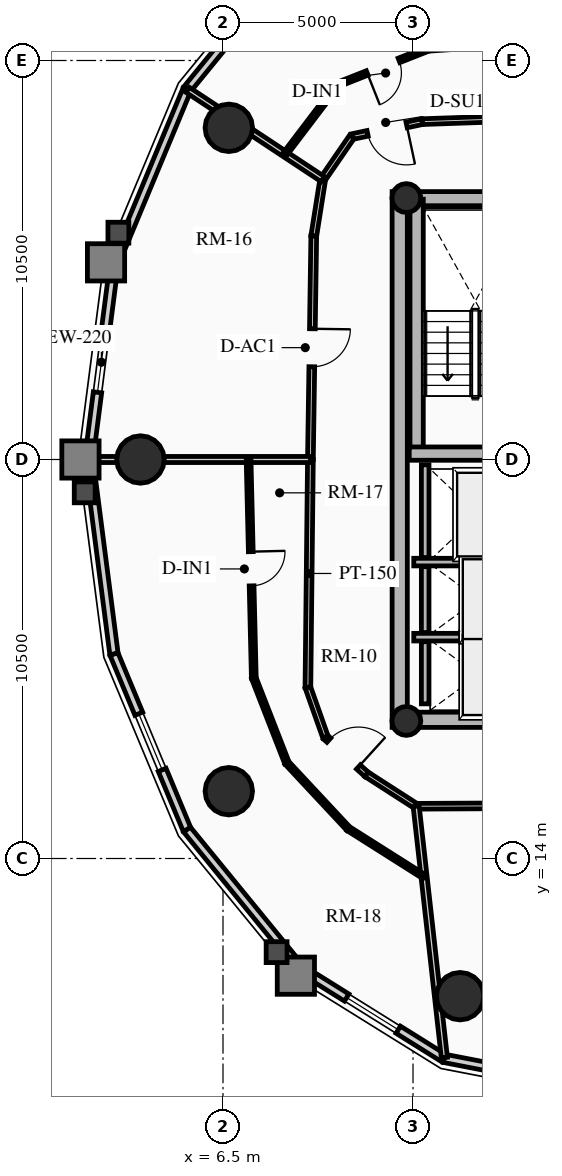
"""IFC4 building model, lengths in metres.
Left out: names, types, materials, properties, quantities, classifications, styles, units other than length and angle.
Written with IfcOpenShell. Run it as: python <this file> out.ifc"""

import sys

from ifc_helpers import new_model, si_unit, direction, frame, frame_2d, origin, origin_2d, place, context, subcontext, project, spatial, rectangle, circle, hollow_circle, extrude, source, transform, mapped, element, fill, save


model = new_model("IFC4")
c1 = context("Model", 3, precision=1e-05, world=origin(), true_north=direction((0.0, 1.0)))
c2 = subcontext(c1, "Body", "Model", "MODEL_VIEW")
j1 = project(units=[si_unit("LENGTHUNIT", "METRE"), si_unit("PLANEANGLEUNIT", "RADIAN")], contexts=[c1])
p1 = place(None, origin())
s1 = spatial("IfcSite", under=j1, at=p1, CompositionType="ELEMENT")
p2 = place(p1, origin())
s2 = spatial("IfcBuilding", under=s1, at=p2, CompositionType="ELEMENT")
p3 = place(p2, frame((0.0, 0.0, 169.06)))
s3 = spatial("IfcBuildingStorey", under=s2, at=p3, CompositionType="ELEMENT", Elevation=169.06)
p4 = place(p3, frame((11.15, 17.45, 0.0), z_axis=(0.0, 0.0, 1.0), x_axis=(0.0, 1.0, 0.0)))
e1 = element("IfcWall", 1, at=p4, inside=s3, PredefinedType="SHEAR", context=c2, shape_type="SweptSolid", body=[
    extrude(rectangle(XDim=14.1, YDim=0.4, at=frame_2d((7.05, 0.0))), origin(), (0.0, 0.0, 1.0), 2.91),
])
p5 = place(p3, frame((11.15, 17.65, 0.0), z_axis=(0.0, 0.0, 1.0), x_axis=(1.0, 0.0, 0.0)))
e2 = element("IfcWall", 2, at=p5, inside=s3, PredefinedType="SHEAR", context=c2, shape_type="SweptSolid", body=[
    extrude(rectangle(XDim=10.7, YDim=0.4, at=frame_2d((5.35, 0.0))), origin(), (0.0, 0.0, 1.0), 2.91),
])
m1 = source(origin(), c2, "Body", "SweptSolid", [
    extrude(rectangle(XDim=1.5, YDim=2.02, at=frame_2d((0.75, 1.01))), frame((0.0, 0.21, 0.0), z_axis=(0.0, -1.0, 0.0), x_axis=(1.0, 0.0, 0.0)), (0.0, 0.0, 1.0), 0.42),
])
p6 = place(p5, frame((5.45, 0.0, 0.0)))
e3 = element("IfcOpeningElement", 3, at=p6, cuts=e2, PredefinedType="OPENING", context=c2, shape_type="MappedRepresentation", body=[
    mapped(m1, transform((0.0, 0.0, 0.0), x_axis=(1.0, 0.0, 0.0), y_axis=(0.0, 1.0, 0.0), z_axis=(0.0, 0.0, 1.0), scale=1.0)),
])
p7 = place(p3, frame((11.15, 31.35, 0.0), z_axis=(0.0, 0.0, 1.0), x_axis=(1.0, 0.0, 0.0)))
e4 = element("IfcWall", 4, at=p7, inside=s3, PredefinedType="SHEAR", context=c2, shape_type="SweptSolid", body=[
    extrude(rectangle(XDim=10.7, YDim=0.4, at=frame_2d((5.35, 0.0))), origin(), (0.0, 0.0, 1.0), 2.91),
])
p8 = place(p7, frame((4.6, 0.0, 0.0)))
e5 = element("IfcOpeningElement", 5, at=p8, cuts=e4, PredefinedType="OPENING", context=c2, shape_type="MappedRepresentation", body=[
    mapped(m1, transform((0.0, 0.0, 0.0), x_axis=(1.0, 0.0, 0.0), y_axis=(0.0, 1.0, 0.0), z_axis=(0.0, 0.0, 1.0), scale=1.0)),
])
p9 = place(p3, frame((11.595, 24.655, 0.0), z_axis=(0.0, 0.0, 1.0), x_axis=(0.0, 1.0, 0.0)))
e6 = element("IfcWall", 6, at=p9, inside=s3, PredefinedType="SHEAR", context=c2, shape_type="SweptSolid", body=[
    extrude(rectangle(XDim=6.695, YDim=0.35, at=frame_2d((3.348, 0.0))), origin(), (0.0, 0.0, 1.0), 2.91),
])
p10 = place(p3, frame((11.4, 24.655, 0.0), z_axis=(0.0, 0.0, 1.0), x_axis=(1.0, 0.0, 0.0)))
e7 = element("IfcWall", 7, at=p10, inside=s3, PredefinedType="SHEAR", context=c2, shape_type="SweptSolid", body=[
    extrude(rectangle(XDim=3.285, YDim=0.35, at=frame_2d((1.643, 0.0))), origin(), (0.0, 0.0, 1.0), 2.91),
])
for number, where, z_axis, x_axis in (
    (8, (11.325, 17.62, 0.0), (0.0, 0.0, 1.0), (1.0, 0.0, 0.0)),
    (9, (11.325, 31.38, 0.0), (0.0, 0.0, 1.0), (1.0, 0.0, 0.0)),
):
    element("IfcColumn", number, at=place(p3, frame(where, z_axis=z_axis, x_axis=x_axis)), inside=s3, PredefinedType="COLUMN", context=c2, shape_type="SweptSolid", body=[
        extrude(hollow_circle(Radius=0.38, WallThickness=0.032, at=origin_2d()), origin(), (0.0, 0.0, 1.0), 2.91),
    ])
for number, where, z_axis, x_axis in (
    (10, (6.653, 33.229, 0.0), (0.0, 0.0, 1.0), (1.0, 0.0, 0.0)),
    (11, (4.328, 24.5, 0.0), (0.0, 0.0, 1.0), (1.0, 0.0, 0.0)),
    (12, (6.653, 15.771, 0.0), (0.0, 0.0, 1.0), (1.0, 0.0, 0.0)),
    (13, (12.739, 10.377, 0.0), (0.0, 0.0, 1.0), (1.0, 0.0, 0.0)),
):
    element("IfcColumn", number, at=place(p3, frame(where, z_axis=z_axis, x_axis=x_axis)), inside=s3, PredefinedType="USERDEFINED", context=c2, shape_type="SweptSolid", body=[
        extrude(circle(Radius=0.625, at=origin_2d()), origin(), (0.0, 0.0, 1.0), 2.91),
    ])
p11 = place(p3, frame((5.553, 34.24, 0.0), z_axis=(0.0, 0.0, 1.0), x_axis=(0.632470615287, 0.774584353572, 0.0)))
e14 = element("IfcWall", 14, at=p11, inside=s3, PredefinedType="SOLIDWALL", context=c2, shape_type="SweptSolid", body=[
    extrude(rectangle(XDim=4.733, YDim=0.22, at=frame_2d((2.366, 0.0))), origin(), (0.0, 0.0, 1.0), 2.245),
])
m2 = source(origin(), c2, "Body", "SweptSolid", [
    extrude(rectangle(XDim=1.6, YDim=1.3, at=frame_2d((0.8, 0.65))), frame((0.0, 0.12, 0.0), z_axis=(0.0, -1.0, 0.0), x_axis=(1.0, 0.0, 0.0)), (0.0, 0.0, 1.0), 0.24),
])
p12 = place(p11, frame((1.566, 0.0, 0.65)))
e15 = element("IfcOpeningElement", 15, at=p12, cuts=e14, PredefinedType="OPENING", context=c2, shape_type="MappedRepresentation", body=[
    mapped(m2, transform((0.0, 0.0, 0.0), x_axis=(1.0, 0.0, 0.0), y_axis=(0.0, 1.0, 0.0), z_axis=(0.0, 0.0, 1.0), scale=1.0)),
])
p13 = place(p3, frame((3.631, 29.62, 0.0), z_axis=(0.0, 0.0, 1.0), x_axis=(0.384144094086, 0.923273152961, 0.0)))
e16 = element("IfcWall", 16, at=p13, inside=s3, PredefinedType="SOLIDWALL", context=c2, shape_type="SweptSolid", body=[
    extrude(rectangle(XDim=5.003, YDim=0.22, at=frame_2d((2.501, 0.0))), origin(), (0.0, 0.0, 1.0), 2.245),
])
p14 = place(p3, frame((2.969, 24.5, 0.0), z_axis=(0.0, 0.0, 1.0), x_axis=(0.128287912609, 0.991736966881, 0.0)))
e17 = element("IfcWall", 17, at=p14, inside=s3, PredefinedType="SOLIDWALL", context=c2, shape_type="SweptSolid", body=[
    extrude(rectangle(XDim=5.163, YDim=0.22, at=frame_2d((2.582, 0.0))), origin(), (0.0, 0.0, 1.0), 2.245),
])
p15 = place(p14, frame((1.782, 0.0, 0.65)))
e18 = element("IfcOpeningElement", 18, at=p15, cuts=e17, PredefinedType="OPENING", context=c2, shape_type="MappedRepresentation", body=[
    mapped(m2, transform((0.0, 0.0, 0.0), x_axis=(1.0, 0.0, 0.0), y_axis=(0.0, 1.0, 0.0), z_axis=(0.0, 0.0, 1.0), scale=1.0)),
])
p16 = place(p3, frame((3.631, 19.38, 0.0), z_axis=(0.0, 0.0, 1.0), x_axis=(-0.128287912609, 0.991736966881, 0.0)))
e19 = element("IfcWall", 19, at=p16, inside=s3, PredefinedType="SOLIDWALL", context=c2, shape_type="SweptSolid", body=[
    extrude(rectangle(XDim=5.163, YDim=0.22, at=frame_2d((2.582, 0.0))), origin(), (0.0, 0.0, 1.0), 2.245),
])
p17 = place(p3, frame((5.553, 14.76, 0.0), z_axis=(0.0, 0.0, 1.0), x_axis=(-0.384144094086, 0.923273152961, 0.0)))
e20 = element("IfcWall", 20, at=p17, inside=s3, PredefinedType="SOLIDWALL", context=c2, shape_type="SweptSolid", body=[
    extrude(rectangle(XDim=5.003, YDim=0.22, at=frame_2d((2.501, 0.0))), origin(), (0.0, 0.0, 1.0), 2.245),
])
p18 = place(p17, frame((1.702, 0.0, 0.65)))
e21 = element("IfcOpeningElement", 21, at=p18, cuts=e20, PredefinedType="OPENING", context=c2, shape_type="MappedRepresentation", body=[
    mapped(m2, transform((0.0, 0.0, 0.0), x_axis=(1.0, 0.0, 0.0), y_axis=(0.0, 1.0, 0.0), z_axis=(0.0, 0.0, 1.0), scale=1.0)),
])
p19 = place(p3, frame((8.547, 11.094, 0.0), z_axis=(0.0, 0.0, 1.0), x_axis=(-0.632470615287, 0.774584353572, 0.0)))
e22 = element("IfcWall", 22, at=p19, inside=s3, PredefinedType="SOLIDWALL", context=c2, shape_type="SweptSolid", body=[
    extrude(rectangle(XDim=4.733, YDim=0.22, at=frame_2d((2.366, 0.0))), origin(), (0.0, 0.0, 1.0), 2.245),
])
p20 = place(p3, frame((12.319, 8.741, 0.0), z_axis=(0.0, 0.0, 1.0), x_axis=(-0.848399108042, 0.529357113368, 0.0)))
e23 = element("IfcWall", 23, at=p20, inside=s3, PredefinedType="SOLIDWALL", context=c2, shape_type="SweptSolid", body=[
    extrude(rectangle(XDim=4.446, YDim=0.22, at=frame_2d((2.223, 0.0))), origin(), (0.0, 0.0, 1.0), 2.245),
])
p21 = place(p20, frame((1.423, 0.0, 0.65)))
e24 = element("IfcOpeningElement", 24, at=p21, cuts=e23, PredefinedType="OPENING", context=c2, shape_type="MappedRepresentation", body=[
    mapped(m2, transform((0.0, 0.0, 0.0), x_axis=(1.0, 0.0, 0.0), y_axis=(0.0, 1.0, 0.0), z_axis=(0.0, 0.0, 1.0), scale=1.0)),
])
p22 = place(p3, frame((16.5, 7.93, 0.0), z_axis=(0.0, 0.0, 1.0), x_axis=(-0.981703883443, 0.190413983815, 0.0)))
e25 = element("IfcWall", 25, at=p22, inside=s3, PredefinedType="SOLIDWALL", context=c2, shape_type="SweptSolid", body=[
    extrude(rectangle(XDim=4.259, YDim=0.22, at=frame_2d((2.13, 0.0))), origin(), (0.0, 0.0, 1.0), 2.245),
])
p23 = place(p22, frame((1.33, 0.0, 0.65)))
e26 = element("IfcOpeningElement", 26, at=p23, cuts=e25, PredefinedType="OPENING", context=c2, shape_type="MappedRepresentation", body=[
    mapped(m2, transform((0.0, 0.0, 0.0), x_axis=(1.0, 0.0, 0.0), y_axis=(0.0, 1.0, 0.0), z_axis=(0.0, 0.0, 1.0), scale=1.0)),
])
p24 = place(p3, frame((11.52, 21.8, 0.0), z_axis=(0.0, 0.0, 1.0), x_axis=(1.0, 0.0, 0.0)))
e27 = element("IfcWall", 27, at=p24, inside=s3, PredefinedType="SHEAR", context=c2, shape_type="SweptSolid", body=[
    extrude(rectangle(XDim=2.97, YDim=0.2, at=frame_2d((1.485, 0.0))), origin(), (0.0, 0.0, 1.0), 2.91),
])
p25 = place(p3, frame((11.82, 21.92, 0.0), z_axis=(0.0, 0.0, 1.0), x_axis=(0.0, 1.0, 0.0)))
e28 = element("IfcWall", 28, at=p25, inside=s3, PredefinedType="SHEAR", context=c2, shape_type="SweptSolid", body=[
    extrude(rectangle(XDim=2.44, YDim=0.2, at=frame_2d((1.22, 0.0))), origin(), (0.0, 0.0, 1.0), 2.91),
])
p26 = place(p3, frame((11.52, 19.825, 0.0), z_axis=(0.0, 0.0, 1.0), x_axis=(1.0, 0.0, 0.0)))
e29 = element("IfcWall", 29, at=p26, inside=s3, PredefinedType="SHEAR", context=c2, shape_type="SweptSolid", body=[
    extrude(rectangle(XDim=2.97, YDim=0.2, at=frame_2d((1.485, 0.0))), origin(), (0.0, 0.0, 1.0), 2.91),
])
p27 = place(p3, frame((11.82, 19.945, 0.0), z_axis=(0.0, 0.0, 1.0), x_axis=(0.0, 1.0, 0.0)))
e30 = element("IfcWall", 30, at=p27, inside=s3, PredefinedType="SHEAR", context=c2, shape_type="SweptSolid", body=[
    extrude(rectangle(XDim=1.735, YDim=0.2, at=frame_2d((0.867, 0.0))), origin(), (0.0, 0.0, 1.0), 2.91),
])
p28 = place(p3, frame((11.82, 18.07, 0.0), z_axis=(0.0, 0.0, 1.0), x_axis=(0.0, 1.0, 0.0)))
e31 = element("IfcWall", 31, at=p28, inside=s3, PredefinedType="SHEAR", context=c2, shape_type="SweptSolid", body=[
    extrude(rectangle(XDim=1.635, YDim=0.2, at=frame_2d((0.817, 0.0))), origin(), (0.0, 0.0, 1.0), 2.91),
])
p29 = place(p3, frame((18.102, 33.61, 0.0), z_axis=(0.0, 0.0, 1.0), x_axis=(-0.999410320072, -0.034336746121, 0.0)))
e32 = element("IfcWall", 32, at=p29, inside=s3, PredefinedType="PARTITIONING", context=c2, shape_type="SweptSolid", body=[
    extrude(rectangle(XDim=6.364, YDim=0.15, at=frame_2d((3.182, 0.0))), origin(), (0.0, 0.0, 1.0), 2.245),
])
p30 = place(p3, frame((11.742, 33.391, 0.0), z_axis=(0.0, 0.0, 1.0), x_axis=(-0.977853431612, -0.209290865268, 0.0)))
e33 = element("IfcWall", 33, at=p30, inside=s3, PredefinedType="PARTITIONING", context=c2, shape_type="SweptSolid", body=[
    extrude(rectangle(XDim=1.89, YDim=0.15, at=frame_2d((0.945, 0.0))), origin(), (0.0, 0.0, 1.0), 2.245),
])
m3 = source(origin(), c2, "Body", "SweptSolid", [
    extrude(rectangle(XDim=1.05, YDim=2.015, at=frame_2d((0.525, 1.007))), frame((0.0, 0.085, 0.0), z_axis=(0.0, -1.0, 0.0), x_axis=(1.0, 0.0, 0.0)), (0.0, 0.0, 1.0), 0.17),
])
p31 = place(p30, frame((0.42, 0.0, 0.0)))
e34 = element("IfcOpeningElement", 34, at=p31, cuts=e33, PredefinedType="OPENING", context=c2, shape_type="MappedRepresentation", body=[
    mapped(m3, transform((0.0, 0.0, 0.0), x_axis=(1.0, 0.0, 0.0), y_axis=(0.0, 1.0, 0.0), z_axis=(0.0, 0.0, 1.0), scale=1.0)),
])
p32 = place(p3, frame((9.894, 32.996, 0.0), z_axis=(0.0, 0.0, 1.0), x_axis=(-0.566521185207, -0.824047175052, 0.0)))
e35 = element("IfcWall", 35, at=p32, inside=s3, PredefinedType="PARTITIONING", context=c2, shape_type="SweptSolid", body=[
    extrude(rectangle(XDim=1.357, YDim=0.15, at=frame_2d((0.678, 0.0))), origin(), (0.0, 0.0, 1.0), 2.245),
])
p33 = place(p3, frame((9.126, 31.878, 0.0), z_axis=(0.0, 0.0, 1.0), x_axis=(-0.156632813117, -0.98765690493, 0.0)))
e36 = element("IfcWall", 36, at=p33, inside=s3, PredefinedType="PARTITIONING", context=c2, shape_type="SweptSolid", body=[
    extrude(rectangle(XDim=1.515, YDim=0.15, at=frame_2d((0.758, 0.0))), origin(), (0.0, 0.0, 1.0), 2.245),
])
p34 = place(p3, frame((8.888, 30.381, 0.0), z_axis=(0.0, 0.0, 1.0), x_axis=(-0.015025285815, -0.999887114021, 0.0)))
e37 = element("IfcWall", 37, at=p34, inside=s3, PredefinedType="PARTITIONING", context=c2, shape_type="SweptSolid", body=[
    extrude(rectangle(XDim=5.882, YDim=0.15, at=frame_2d((2.941, 0.0))), origin(), (0.0, 0.0, 1.0), 2.675),
])
m4 = source(origin(), c2, "Body", "SweptSolid", [
    extrude(rectangle(XDim=1.0, YDim=2.015, at=frame_2d((0.5, 1.007))), frame((0.0, 0.085, 0.0), z_axis=(0.0, -1.0, 0.0), x_axis=(1.0, 0.0, 0.0)), (0.0, 0.0, 1.0), 0.17),
])
p35 = place(p34, frame((2.441, 0.0, 0.0)))
e38 = element("IfcOpeningElement", 38, at=p35, cuts=e37, PredefinedType="OPENING", context=c2, shape_type="MappedRepresentation", body=[
    mapped(m4, transform((0.0, 0.0, 0.0), x_axis=(1.0, 0.0, 0.0), y_axis=(0.0, 1.0, 0.0), z_axis=(0.0, 0.0, 1.0), scale=1.0)),
])
p36 = place(p3, frame((8.8, 24.5, 0.0), z_axis=(0.0, 0.0, 1.0), x_axis=(-0.011028591374, -0.999939183237, 0.0)))
e39 = element("IfcWall", 39, at=p36, inside=s3, PredefinedType="PARTITIONING", context=c2, shape_type="SweptSolid", body=[
    extrude(rectangle(XDim=5.999, YDim=0.15, at=frame_2d((3.0, 0.0))), origin(), (0.0, 0.0, 1.0), 2.245),
])
p37 = place(p3, frame((8.734, 18.501, 0.0), z_axis=(0.0, 0.0, 1.0), x_axis=(0.333612366873, -0.94271034187, 0.0)))
e40 = element("IfcWall", 40, at=p37, inside=s3, PredefinedType="PARTITIONING", context=c2, shape_type="SweptSolid", body=[
    extrude(rectangle(XDim=1.386, YDim=0.15, at=frame_2d((0.693, 0.0))), origin(), (0.0, 0.0, 1.0), 2.245),
])
p38 = place(p3, frame((9.196, 17.195, 0.0), z_axis=(0.0, 0.0, 1.0), x_axis=(0.740734525483, -0.671797858553, 0.0)))
e41 = element("IfcWall", 41, at=p38, inside=s3, PredefinedType="PARTITIONING", context=c2, shape_type="SweptSolid", body=[
    extrude(rectangle(XDim=1.459, YDim=0.15, at=frame_2d((0.729, 0.0))), origin(), (0.0, 0.0, 1.0), 2.245),
])
p39 = place(p38, frame((0.12, 0.0, 0.0)))
e42 = element("IfcOpeningElement", 42, at=p39, cuts=e41, PredefinedType="OPENING", context=c2, shape_type="MappedRepresentation", body=[
    mapped(m3, transform((0.0, 0.0, 0.0), x_axis=(1.0, 0.0, 0.0), y_axis=(0.0, 1.0, 0.0), z_axis=(0.0, 0.0, 1.0), scale=1.0)),
])
p40 = place(p3, frame((10.277, 16.214, 0.0), z_axis=(0.0, 0.0, 1.0), x_axis=(0.841060909507, -0.540940427865, 0.0)))
e43 = element("IfcWall", 43, at=p40, inside=s3, PredefinedType="PARTITIONING", context=c2, shape_type="SweptSolid", body=[
    extrude(rectangle(XDim=1.552, YDim=0.15, at=frame_2d((0.776, 0.0))), origin(), (0.0, 0.0, 1.0), 2.245),
])
p41 = place(p3, frame((11.583, 15.375, 0.0), z_axis=(0.0, 0.0, 1.0), x_axis=(0.999988014548, 0.004895994347, 0.0)))
e44 = element("IfcWall", 44, at=p41, inside=s3, PredefinedType="PARTITIONING", context=c2, shape_type="SweptSolid", body=[
    extrude(rectangle(XDim=3.241, YDim=0.15, at=frame_2d((1.621, 0.0))), origin(), (0.0, 0.0, 1.0), 2.245),
])
p42 = place(p3, frame((9.126, 31.878, 0.0), z_axis=(0.0, 0.0, 1.0), x_axis=(-0.834299098788, 0.551312083815, 0.0)))
e45 = element("IfcWall", 45, at=p42, inside=s3, PredefinedType="PARTITIONING", context=c2, shape_type="SweptSolid", body=[
    extrude(rectangle(XDim=4.263, YDim=0.16, at=frame_2d((2.131, 0.0))), origin(), (0.0, 0.0, 1.0), 2.245),
])
p43 = place(p3, frame((8.8, 24.5, 0.0), z_axis=(0.0, 0.0, 1.0), x_axis=(-1.0, 0.0, 0.0)))
e46 = element("IfcWall", 46, at=p43, inside=s3, PredefinedType="PARTITIONING", context=c2, shape_type="SweptSolid", body=[
    extrude(rectangle(XDim=5.811, YDim=0.16, at=frame_2d((2.906, 0.0))), origin(), (0.0, 0.0, 1.0), 2.245),
])
p44 = place(p3, frame((11.583, 15.375, 0.0), z_axis=(0.0, 0.0, 1.0), x_axis=(0.111538514066, -0.993760111838, 0.0)))
e47 = element("IfcWall", 47, at=p44, inside=s3, PredefinedType="PARTITIONING", context=c2, shape_type="SweptSolid", body=[
    extrude(rectangle(XDim=6.656, YDim=0.16, at=frame_2d((3.328, 0.0))), origin(), (0.0, 0.0, 1.0), 2.245),
])
p45 = place(p3, frame((11.906, 35.309, 0.0), z_axis=(0.0, 0.0, 1.0), x_axis=(-0.930011423211, -0.367530614639, 0.0)))
e48 = element("IfcWall", 48, at=p45, inside=s3, PredefinedType="PARTITIONING", context=c2, shape_type="SweptSolid", body=[
    extrude(rectangle(XDim=2.565, YDim=0.125, at=frame_2d((1.282, 0.0))), origin(), (0.0, 0.0, 1.0), 2.245),
])
m5 = source(origin(), c2, "Body", "SweptSolid", [
    extrude(rectangle(XDim=0.9, YDim=2.005, at=frame_2d((0.45, 1.002))), frame((0.0, 0.073, 0.0), z_axis=(0.0, -1.0, 0.0), x_axis=(1.0, 0.0, 0.0)), (0.0, 0.0, 1.0), 0.145),
])
p46 = place(p45, frame((0.832, 0.0, 0.0)))
e49 = element("IfcOpeningElement", 49, at=p46, cuts=e48, PredefinedType="OPENING", context=c2, shape_type="MappedRepresentation", body=[
    mapped(m5, transform((0.0, 0.0, 0.0), x_axis=(1.0, 0.0, 0.0), y_axis=(0.0, 1.0, 0.0), z_axis=(0.0, 0.0, 1.0), scale=1.0)),
])
p47 = place(p3, frame((9.52, 34.366, 0.0), z_axis=(0.0, 0.0, 1.0), x_axis=(-0.604900120492, -0.796301352648, 0.0)))
e50 = element("IfcWall", 50, at=p47, inside=s3, PredefinedType="PARTITIONING", context=c2, shape_type="SweptSolid", body=[
    extrude(rectangle(XDim=2.299, YDim=0.125, at=frame_2d((1.149, 0.0))), origin(), (0.0, 0.0, 1.0), 2.245),
])
p48 = place(p3, frame((7.173, 24.5, 0.0), z_axis=(0.0, 0.0, 1.0), x_axis=(0.023936084601, -0.999713490883, 0.0)))
e51 = element("IfcWall", 51, at=p48, inside=s3, PredefinedType="PARTITIONING", context=c2, shape_type="SweptSolid", body=[
    extrude(rectangle(XDim=5.753, YDim=0.125, at=frame_2d((2.876, 0.0))), origin(), (0.0, 0.0, 1.0), 2.245),
])
p49 = place(p48, frame((2.426, 0.0, 0.0)))
e52 = element("IfcOpeningElement", 52, at=p49, cuts=e51, PredefinedType="OPENING", context=c2, shape_type="MappedRepresentation", body=[
    mapped(m5, transform((0.0, 0.0, 0.0), x_axis=(1.0, 0.0, 0.0), y_axis=(0.0, 1.0, 0.0), z_axis=(0.0, 0.0, 1.0), scale=1.0)),
])
p50 = place(p3, frame((7.311, 18.749, 0.0), z_axis=(0.0, 0.0, 1.0), x_axis=(0.363119757726, -0.931742475982, 0.0)))
e53 = element("IfcWall", 53, at=p50, inside=s3, PredefinedType="PARTITIONING", context=c2, shape_type="SweptSolid", body=[
    extrude(rectangle(XDim=2.396, YDim=0.125, at=frame_2d((1.198, 0.0))), origin(), (0.0, 0.0, 1.0), 2.245),
])
p51 = place(p3, frame((8.181, 16.516, 0.0), z_axis=(0.0, 0.0, 1.0), x_axis=(0.682244764422, -0.731123848209, 0.0)))
e54 = element("IfcWall", 54, at=p51, inside=s3, PredefinedType="PARTITIONING", context=c2, shape_type="SweptSolid", body=[
    extrude(rectangle(XDim=2.367, YDim=0.125, at=frame_2d((1.184, 0.0))), origin(), (0.0, 0.0, 1.0), 2.245),
])
p52 = place(p3, frame((9.796, 14.785, 0.0), z_axis=(0.0, 0.0, 1.0), x_axis=(0.844898543763, -0.534926584446, 0.0)))
e55 = element("IfcWall", 55, at=p52, inside=s3, PredefinedType="PARTITIONING", context=c2, shape_type="SweptSolid", body=[
    extrude(rectangle(XDim=2.361, YDim=0.125, at=frame_2d((1.18, 0.0))), origin(), (0.0, 0.0, 1.0), 2.245),
])
m6 = source(origin(), c2, "Body", "SweptSolid", [
    extrude(rectangle(XDim=1.6, YDim=1.3, at=frame_2d((0.8, 0.65))), frame((0.0, 0.03, 0.0), z_axis=(0.0, -1.0, 0.0), x_axis=(1.0, 0.0, 0.0)), (0.0, 0.0, 1.0), 0.06),
])
p53 = place(p15, origin())
e56 = element("IfcWindow", 56, at=p53, inside=s3, PartitioningType="SINGLE_PANEL", PredefinedType="WINDOW", context=c2, shape_type="MappedRepresentation", body=[
    mapped(m6, transform((0.0, 0.0, 0.0), x_axis=(1.0, 0.0, 0.0), y_axis=(0.0, 1.0, 0.0), z_axis=(0.0, 0.0, 1.0), scale=1.0)),
])
fill(e18, e56)
p54 = place(p18, origin())
e57 = element("IfcWindow", 57, at=p54, inside=s3, PartitioningType="SINGLE_PANEL", PredefinedType="WINDOW", context=c2, shape_type="MappedRepresentation", body=[
    mapped(m6, transform((0.0, 0.0, 0.0), x_axis=(1.0, 0.0, 0.0), y_axis=(0.0, 1.0, 0.0), z_axis=(0.0, 0.0, 1.0), scale=1.0)),
])
fill(e21, e57)
p55 = place(p21, origin())
e58 = element("IfcWindow", 58, at=p55, inside=s3, PartitioningType="SINGLE_PANEL", PredefinedType="WINDOW", context=c2, shape_type="MappedRepresentation", body=[
    mapped(m6, transform((0.0, 0.0, 0.0), x_axis=(1.0, 0.0, 0.0), y_axis=(0.0, 1.0, 0.0), z_axis=(0.0, 0.0, 1.0), scale=1.0)),
])
fill(e24, e58)
m7 = source(origin(), c2, "Body", "SweptSolid", [
    extrude(rectangle(XDim=1.05, YDim=2.015, at=frame_2d((0.525, 1.007))), frame((0.0, 0.025, 0.0), z_axis=(0.0, -1.0, 0.0), x_axis=(1.0, 0.0, 0.0)), (0.0, 0.0, 1.0), 0.05),
])
p56 = place(p31, origin())
e59 = element("IfcDoor", 59, at=p56, inside=s3, OperationType="SINGLE_SWING_LEFT", PredefinedType="DOOR", context=c2, shape_type="MappedRepresentation", body=[
    mapped(m7, transform((0.0, 0.0, 0.0), x_axis=(1.0, 0.0, 0.0), y_axis=(0.0, 1.0, 0.0), z_axis=(0.0, 0.0, 1.0), scale=1.0)),
])
fill(e34, e59)
m8 = source(origin(), c2, "Body", "SweptSolid", [
    extrude(rectangle(XDim=0.9, YDim=2.005, at=frame_2d((0.45, 1.002))), frame((0.0, 0.025, 0.0), z_axis=(0.0, -1.0, 0.0), x_axis=(1.0, 0.0, 0.0)), (0.0, 0.0, 1.0), 0.05),
])
p57 = place(p46, origin())
e60 = element("IfcDoor", 60, at=p57, inside=s3, OperationType="SINGLE_SWING_RIGHT", PredefinedType="DOOR", context=c2, shape_type="MappedRepresentation", body=[
    mapped(m8, transform((0.0, 0.0, 0.0), x_axis=(1.0, 0.0, 0.0), y_axis=(0.0, 1.0, 0.0), z_axis=(0.0, 0.0, 1.0), scale=1.0)),
])
fill(e49, e60)
m9 = source(origin(), c2, "Body", "SweptSolid", [
    extrude(rectangle(XDim=1.0, YDim=2.015, at=frame_2d((0.5, 1.007))), frame((0.0, 0.025, 0.0), z_axis=(0.0, -1.0, 0.0), x_axis=(1.0, 0.0, 0.0)), (0.0, 0.0, 1.0), 0.05),
])
p58 = place(p35, origin())
e61 = element("IfcDoor", 61, at=p58, inside=s3, OperationType="SINGLE_SWING_LEFT", PredefinedType="DOOR", context=c2, shape_type="MappedRepresentation", body=[
    mapped(m9, transform((0.0, 0.0, 0.0), x_axis=(1.0, 0.0, 0.0), y_axis=(0.0, 1.0, 0.0), z_axis=(0.0, 0.0, 1.0), scale=1.0)),
])
fill(e38, e61)
p59 = place(p39, origin())
e62 = element("IfcDoor", 62, at=p59, inside=s3, OperationType="SINGLE_SWING_RIGHT", PredefinedType="DOOR", context=c2, shape_type="MappedRepresentation", body=[
    mapped(m7, transform((0.0, 0.0, 0.0), x_axis=(1.0, 0.0, 0.0), y_axis=(0.0, 1.0, 0.0), z_axis=(0.0, 0.0, 1.0), scale=1.0)),
])
fill(e42, e62)
p60 = place(p49, origin())
e63 = element("IfcDoor", 63, at=p60, inside=s3, OperationType="SINGLE_SWING_LEFT", PredefinedType="DOOR", context=c2, shape_type="MappedRepresentation", body=[
    mapped(m8, transform((0.0, 0.0, 0.0), x_axis=(1.0, 0.0, 0.0), y_axis=(0.0, 1.0, 0.0), z_axis=(0.0, 0.0, 1.0), scale=1.0)),
])
fill(e52, e63)
save(model, sys.argv[1])
